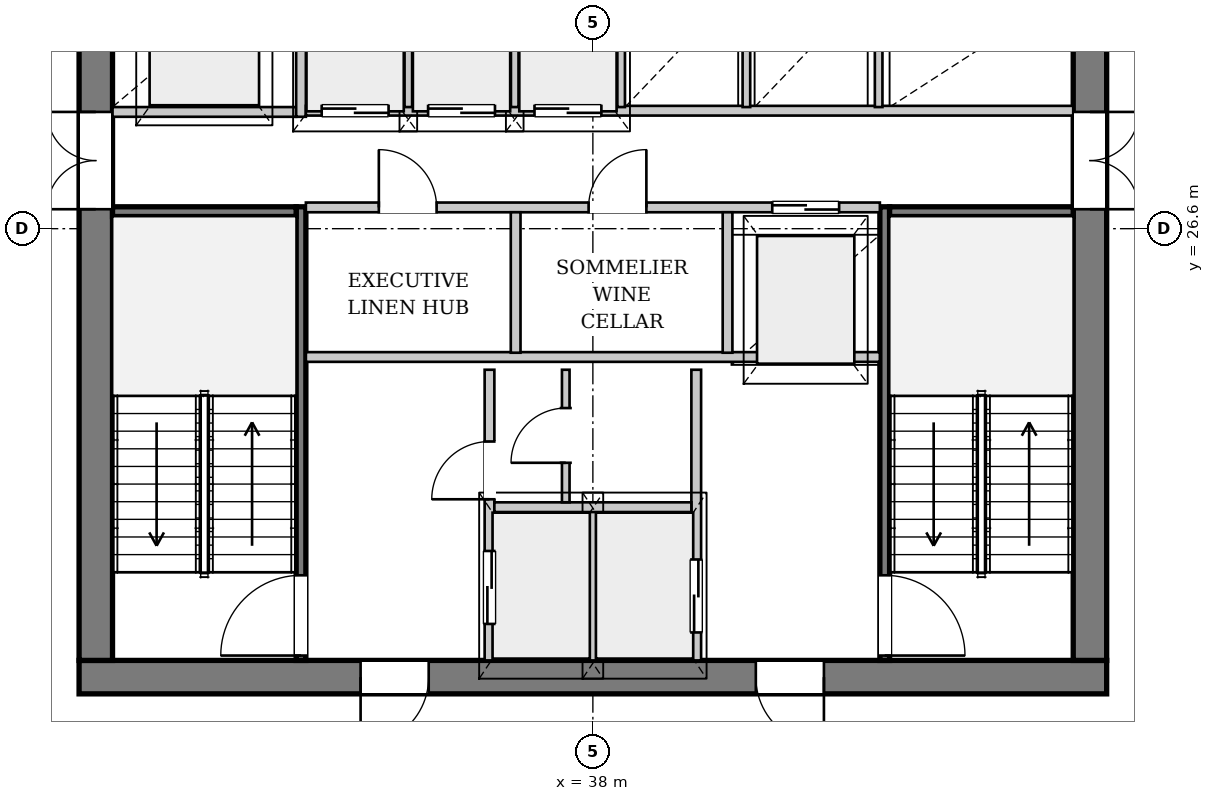
"""IFC4 building model, lengths in metres.
Left out: names, types, materials, properties, quantities, classifications, styles, units other than length and angle.
Written with IfcOpenShell. Run it as: python <this file> out.ifc"""

import sys

from ifc_helpers import new_model, si_unit, direction, frame, frame_2d, origin, place, context, subcontext, project, spatial, rectangle, extrude, source, transform, mapped, element, fill, save


model = new_model("IFC4")
c1 = context("Model", 3, precision=1e-05, world=origin(), true_north=direction((0.0, 1.0)))
c2 = subcontext(c1, "Body", "Model", "MODEL_VIEW")
j1 = project(units=[si_unit("LENGTHUNIT", "METRE"), si_unit("PLANEANGLEUNIT", "RADIAN")], contexts=[c1])
p1 = place(None, origin())
s1 = spatial("IfcSite", under=j1, at=p1, CompositionType="ELEMENT")
p2 = place(p1, origin())
s2 = spatial("IfcBuilding", under=s1, at=p2, CompositionType="ELEMENT")
p3 = place(p2, frame((0.0, 0.0, 153.7)))
s3 = spatial("IfcBuildingStorey", under=s2, at=p3, CompositionType="ELEMENT", Elevation=153.7)
p4 = place(p3, frame((52.816, 18.875, 0.0), z_axis=(0.0, 0.0, 1.0), x_axis=(-0.717927185301, -0.696118205914, 0.0)))
e1 = element("IfcWall", 1, at=p4, inside=s3, PredefinedType="SOLIDWALL", context=c2, shape_type="SweptSolid", body=[
    extrude(rectangle(XDim=23.598, YDim=0.32, at=frame_2d((11.799, 0.0))), origin(), (0.0, 0.0, 1.0), 2.692),
])
p5 = place(p4, frame((6.801, 0.0, 0.0)))
e2 = element("IfcOpeningElement", 2, at=p5, cuts=e1, PredefinedType="OPENING", context=c2, shape_type="SweptSolid", body=[
    extrude(rectangle(XDim=1.5, YDim=2.3, at=frame_2d((0.75, 1.15))), frame((0.0, 0.17, 0.0), z_axis=(0.0, -1.0, 0.0), x_axis=(1.0, 0.0, 0.0)), (0.0, 0.0, 1.0), 0.34),
])
p6 = place(p4, frame((16.163, 0.0, 0.25)))
e3 = element("IfcOpeningElement", 3, at=p6, cuts=e1, PredefinedType="OPENING", context=c2, shape_type="SweptSolid", body=[
    extrude(rectangle(XDim=2.6, YDim=2.35, at=frame_2d((1.3, 1.175))), frame((0.0, 0.17, 0.0), z_axis=(0.0, -1.0, 0.0), x_axis=(1.0, 0.0, 0.0)), (0.0, 0.0, 1.0), 0.34),
])
p7 = place(p3, frame((46.45, 19.225, 0.0), z_axis=(0.0, 0.0, 1.0), x_axis=(-1.0, 0.0, 0.0)))
e4 = element("IfcWall", 4, at=p7, inside=s3, PredefinedType="SHEAR", context=c2, shape_type="SweptSolid", body=[
    extrude(rectangle(XDim=16.9, YDim=0.55, at=frame_2d((8.45, 0.0))), origin(), (0.0, 0.0, 1.0), 3.3),
])
p8 = place(p7, frame((4.65, 0.0, 0.0)))
e5 = element("IfcOpeningElement", 5, at=p8, cuts=e4, PredefinedType="OPENING", context=c2, shape_type="SweptSolid", body=[
    extrude(rectangle(XDim=1.12, YDim=2.25, at=frame_2d((0.56, 1.125))), frame((0.0, 0.285, 0.0), z_axis=(0.0, -1.0, 0.0), x_axis=(1.0, 0.0, 0.0)), (0.0, 0.0, 1.0), 0.57),
])
p9 = place(p7, frame((11.15, 0.0, 0.0)))
e6 = element("IfcOpeningElement", 6, at=p9, cuts=e4, PredefinedType="OPENING", context=c2, shape_type="SweptSolid", body=[
    extrude(rectangle(XDim=1.12, YDim=2.25, at=frame_2d((0.56, 1.125))), frame((0.0, 0.285, 0.0), z_axis=(0.0, -1.0, 0.0), x_axis=(1.0, 0.0, 0.0)), (0.0, 0.0, 1.0), 0.57),
])
p10 = place(p3, frame((29.825, 19.5, 0.0), z_axis=(0.0, 0.0, 1.0), x_axis=(0.0, 1.0, 0.0)))
e7 = element("IfcWall", 7, at=p10, inside=s3, PredefinedType="SHEAR", context=c2, shape_type="SweptSolid", body=[
    extrude(rectangle(XDim=14.2, YDim=0.55, at=frame_2d((7.1, 0.0))), origin(), (0.0, 0.0, 1.0), 3.3),
])
p11 = place(p10, frame((7.42, 0.0, 0.0)))
e8 = element("IfcOpeningElement", 8, at=p11, cuts=e7, PredefinedType="OPENING", context=c2, shape_type="SweptSolid", body=[
    extrude(rectangle(XDim=1.6, YDim=2.2, at=frame_2d((0.8, 1.1))), frame((0.0, 0.285, 0.0), z_axis=(0.0, -1.0, 0.0), x_axis=(1.0, 0.0, 0.0)), (0.0, 0.0, 1.0), 0.57),
])
p12 = place(p3, frame((46.175, 33.7, 0.0), z_axis=(0.0, 0.0, 1.0), x_axis=(0.0, -1.0, 0.0)))
e9 = element("IfcWall", 9, at=p12, inside=s3, PredefinedType="SHEAR", context=c2, shape_type="SweptSolid", body=[
    extrude(rectangle(XDim=14.2, YDim=0.55, at=frame_2d((7.1, 0.0))), origin(), (0.0, 0.0, 1.0), 3.3),
])
p13 = place(p12, frame((5.18, 0.0, 0.0)))
e10 = element("IfcOpeningElement", 10, at=p13, cuts=e9, PredefinedType="OPENING", context=c2, shape_type="SweptSolid", body=[
    extrude(rectangle(XDim=1.6, YDim=2.2, at=frame_2d((0.8, 1.1))), frame((0.0, 0.285, 0.0), z_axis=(0.0, -1.0, 0.0), x_axis=(1.0, 0.0, 0.0)), (0.0, 0.0, 1.0), 0.57),
])
p14 = place(p12, frame((2.05, 0.0, 0.0)))
e11 = element("IfcOpeningElement", 11, at=p14, cuts=e9, PredefinedType="OPENING", context=c2, shape_type="SweptSolid", body=[
    extrude(rectangle(XDim=0.95, YDim=2.1, at=frame_2d((0.475, 1.05))), frame((0.0, 0.285, 0.0), z_axis=(0.0, -1.0, 0.0), x_axis=(1.0, 0.0, 0.0)), (0.0, 0.0, 1.0), 0.57),
])
p15 = place(p3, frame((33.2, 19.5, 0.0), z_axis=(0.0, 0.0, 1.0), x_axis=(0.0, 1.0, 0.0)))
e12 = element("IfcWall", 12, at=p15, inside=s3, PredefinedType="PARTITIONING", context=c2, shape_type="SweptSolid", body=[
    extrude(rectangle(XDim=7.46, YDim=0.16, at=frame_2d((3.73, 0.0))), origin(), (0.0, 0.0, 1.0), 3.3),
])
p16 = place(p15, frame((0.08, 0.0, 0.0)))
e13 = element("IfcOpeningElement", 13, at=p16, cuts=e12, PredefinedType="OPENING", context=c2, shape_type="SweptSolid", body=[
    extrude(rectangle(XDim=1.32, YDim=2.2, at=frame_2d((0.66, 1.1))), frame((0.0, 0.09, 0.0), z_axis=(0.0, -1.0, 0.0), x_axis=(1.0, 0.0, 0.0)), (0.0, 0.0, 1.0), 0.18),
])
p17 = place(p3, frame((30.1, 26.88, 0.0), z_axis=(0.0, 0.0, 1.0), x_axis=(1.0, 0.0, 0.0)))
e14 = element("IfcWall", 14, at=p17, inside=s3, PredefinedType="PARTITIONING", context=c2, shape_type="SweptSolid", body=[
    extrude(rectangle(XDim=3.02, YDim=0.16, at=frame_2d((1.51, 0.0))), origin(), (0.0, 0.0, 1.0), 3.3),
])
p18 = place(p3, frame((42.8, 26.96, 0.0), z_axis=(0.0, 0.0, 1.0), x_axis=(0.0, -1.0, 0.0)))
e15 = element("IfcWall", 15, at=p18, inside=s3, PredefinedType="PARTITIONING", context=c2, shape_type="SweptSolid", body=[
    extrude(rectangle(XDim=7.46, YDim=0.16, at=frame_2d((3.73, 0.0))), origin(), (0.0, 0.0, 1.0), 3.3),
])
p19 = place(p18, frame((6.06, 0.0, 0.0)))
e16 = element("IfcOpeningElement", 16, at=p19, cuts=e15, PredefinedType="OPENING", context=c2, shape_type="SweptSolid", body=[
    extrude(rectangle(XDim=1.32, YDim=2.2, at=frame_2d((0.66, 1.1))), frame((0.0, 0.09, 0.0), z_axis=(0.0, -1.0, 0.0), x_axis=(1.0, 0.0, 0.0)), (0.0, 0.0, 1.0), 0.18),
])
p20 = place(p3, frame((42.88, 26.88, 0.0), z_axis=(0.0, 0.0, 1.0), x_axis=(1.0, 0.0, 0.0)))
e17 = element("IfcWall", 17, at=p20, inside=s3, PredefinedType="PARTITIONING", context=c2, shape_type="SweptSolid", body=[
    extrude(rectangle(XDim=3.02, YDim=0.16, at=frame_2d((1.51, 0.0))), origin(), (0.0, 0.0, 1.0), 3.3),
])
p21 = place(p3, frame((36.3, 19.5, 0.0), z_axis=(0.0, 0.0, 1.0), x_axis=(0.0, 1.0, 0.0)))
e18 = element("IfcWall", 18, at=p21, inside=s3, PredefinedType="PARTITIONING", context=c2, shape_type="SweptSolid", body=[
    extrude(rectangle(XDim=4.78, YDim=0.16, at=frame_2d((2.39, 0.0))), origin(), (0.0, 0.0, 1.0), 3.3),
])
p22 = place(p21, frame((0.6, 0.0, 0.0)))
e19 = element("IfcOpeningElement", 19, at=p22, cuts=e18, PredefinedType="OPENING", context=c2, shape_type="SweptSolid", body=[
    extrude(rectangle(XDim=1.2, YDim=2.2, at=frame_2d((0.6, 1.1))), frame((0.0, 0.09, 0.0), z_axis=(0.0, -1.0, 0.0), x_axis=(1.0, 0.0, 0.0)), (0.0, 0.0, 1.0), 0.18),
])
p23 = place(p21, frame((2.65, 0.0, 0.0)))
e20 = element("IfcOpeningElement", 20, at=p23, cuts=e18, PredefinedType="OPENING", context=c2, shape_type="SweptSolid", body=[
    extrude(rectangle(XDim=0.95, YDim=2.1, at=frame_2d((0.475, 1.05))), frame((0.0, 0.09, 0.0), z_axis=(0.0, -1.0, 0.0), x_axis=(1.0, 0.0, 0.0)), (0.0, 0.0, 1.0), 0.18),
])
p24 = place(p3, frame((39.7, 24.28, 0.0), z_axis=(0.0, 0.0, 1.0), x_axis=(0.0, -1.0, 0.0)))
e21 = element("IfcWall", 21, at=p24, inside=s3, PredefinedType="PARTITIONING", context=c2, shape_type="SweptSolid", body=[
    extrude(rectangle(XDim=4.78, YDim=0.16, at=frame_2d((2.39, 0.0))), origin(), (0.0, 0.0, 1.0), 3.3),
])
p25 = place(p24, frame((3.12, 0.0, 0.0)))
e22 = element("IfcOpeningElement", 22, at=p25, cuts=e21, PredefinedType="OPENING", context=c2, shape_type="SweptSolid", body=[
    extrude(rectangle(XDim=1.2, YDim=2.2, at=frame_2d((0.6, 1.1))), frame((0.0, 0.09, 0.0), z_axis=(0.0, -1.0, 0.0), x_axis=(1.0, 0.0, 0.0)), (0.0, 0.0, 1.0), 0.18),
])
p26 = place(p3, frame((38.0, 19.5, 0.0), z_axis=(0.0, 0.0, 1.0), x_axis=(0.0, 1.0, 0.0)))
e23 = element("IfcWall", 23, at=p26, inside=s3, PredefinedType="PARTITIONING", context=c2, shape_type="SweptSolid", body=[
    extrude(rectangle(XDim=2.46, YDim=0.125, at=frame_2d((1.23, 0.0))), origin(), (0.0, 0.0, 1.0), 3.3),
])
p27 = place(p3, frame((36.38, 22.02, 0.0), z_axis=(0.0, 0.0, 1.0), x_axis=(1.0, 0.0, 0.0)))
e24 = element("IfcWall", 24, at=p27, inside=s3, PredefinedType="PARTITIONING", context=c2, shape_type="SweptSolid", body=[
    extrude(rectangle(XDim=3.24, YDim=0.16, at=frame_2d((1.62, 0.0))), origin(), (0.0, 0.0, 1.0), 3.3),
])
p28 = place(p3, frame((33.28, 24.49, 0.0), z_axis=(0.0, 0.0, 1.0), x_axis=(1.0, 0.0, 0.0)))
e25 = element("IfcWall", 25, at=p28, inside=s3, PredefinedType="PARTITIONING", context=c2, shape_type="SweptSolid", body=[
    extrude(rectangle(XDim=9.44, YDim=0.16, at=frame_2d((4.72, 0.0))), origin(), (0.0, 0.0, 1.0), 3.3),
])
p29 = place(p3, frame((37.554, 22.1, 0.0), z_axis=(0.0, 0.0, 1.0), x_axis=(0.0, 1.0, 0.0)))
e26 = element("IfcWall", 26, at=p29, inside=s3, PredefinedType="PARTITIONING", context=c2, shape_type="SweptSolid", body=[
    extrude(rectangle(XDim=2.18, YDim=0.125, at=frame_2d((1.09, 0.0))), origin(), (0.0, 0.0, 1.0), 3.3),
])
p30 = place(p29, frame((0.65, 0.0, 0.0)))
e27 = element("IfcOpeningElement", 27, at=p30, cuts=e26, PredefinedType="OPENING", context=c2, shape_type="SweptSolid", body=[
    extrude(rectangle(XDim=0.9, YDim=2.1, at=frame_2d((0.45, 1.05))), frame((0.0, 0.073, 0.0), z_axis=(0.0, -1.0, 0.0), x_axis=(1.0, 0.0, 0.0)), (0.0, 0.0, 1.0), 0.145),
])
p31 = place(p3, frame((30.1, 28.52, 0.0), z_axis=(0.0, 0.0, 1.0), x_axis=(1.0, 0.0, 0.0)))
e28 = element("IfcWall", 28, at=p31, inside=s3, PredefinedType="PARTITIONING", context=c2, shape_type="SweptSolid", body=[
    extrude(rectangle(XDim=3.02, YDim=0.16, at=frame_2d((1.51, 0.0))), origin(), (0.0, 0.0, 1.0), 3.3),
])
p32 = place(p3, frame((33.2, 28.44, 0.0), z_axis=(0.0, 0.0, 1.0), x_axis=(0.0, 1.0, 0.0)))
e29 = element("IfcWall", 29, at=p32, inside=s3, PredefinedType="PARTITIONING", context=c2, shape_type="SweptSolid", body=[
    extrude(rectangle(XDim=5.26, YDim=0.16, at=frame_2d((2.63, 0.0))), origin(), (0.0, 0.0, 1.0), 3.3),
])
p33 = place(p3, frame((33.28, 26.95, 0.0), z_axis=(0.0, 0.0, 1.0), x_axis=(1.0, 0.0, 0.0)))
e30 = element("IfcWall", 30, at=p33, inside=s3, PredefinedType="PARTITIONING", context=c2, shape_type="SweptSolid", body=[
    extrude(rectangle(XDim=9.44, YDim=0.16, at=frame_2d((4.72, 0.0))), origin(), (0.0, 0.0, 1.0), 3.3),
])
p34 = place(p33, frame((1.2, 0.0, 0.0)))
e31 = element("IfcOpeningElement", 31, at=p34, cuts=e30, PredefinedType="OPENING", context=c2, shape_type="SweptSolid", body=[
    extrude(rectangle(XDim=0.95, YDim=2.1, at=frame_2d((0.475, 1.05))), frame((0.0, 0.09, 0.0), z_axis=(0.0, -1.0, 0.0), x_axis=(1.0, 0.0, 0.0)), (0.0, 0.0, 1.0), 0.18),
])
p35 = place(p33, frame((4.65, 0.0, 0.0)))
e32 = element("IfcOpeningElement", 32, at=p35, cuts=e30, PredefinedType="OPENING", context=c2, shape_type="SweptSolid", body=[
    extrude(rectangle(XDim=0.95, YDim=2.1, at=frame_2d((0.475, 1.05))), frame((0.0, 0.09, 0.0), z_axis=(0.0, -1.0, 0.0), x_axis=(1.0, 0.0, 0.0)), (0.0, 0.0, 1.0), 0.18),
])
p36 = place(p33, frame((7.67, 0.0, 0.0)))
e33 = element("IfcOpeningElement", 33, at=p36, cuts=e30, PredefinedType="OPENING", context=c2, shape_type="SweptSolid", body=[
    extrude(rectangle(XDim=1.1, YDim=2.2, at=frame_2d((0.55, 1.1))), frame((0.0, 0.09, 0.0), z_axis=(0.0, -1.0, 0.0), x_axis=(1.0, 0.0, 0.0)), (0.0, 0.0, 1.0), 0.18),
])
for number, where, z_axis, x_axis in (
    (34, (36.73, 24.56, 0.0), (0.0, 0.0, 1.0), (0.0, 1.0, 0.0)),
    (35, (40.215, 24.56, 0.0), (0.0, 0.0, 1.0), (0.0, 1.0, 0.0)),
):
    element("IfcWall", number, at=place(p3, frame(where, z_axis=z_axis, x_axis=x_axis)), inside=s3, PredefinedType="PARTITIONING", context=c2, shape_type="SweptSolid", body=[
        extrude(rectangle(XDim=2.31, YDim=0.16, at=frame_2d((1.155, 0.0))), origin(), (0.0, 0.0, 1.0), 3.3),
    ])
p37 = place(p3, frame((33.28, 28.54, 0.0), z_axis=(0.0, 0.0, 1.0), x_axis=(1.0, 0.0, 0.0)))
e36 = element("IfcWall", 36, at=p37, inside=s3, PredefinedType="PARTITIONING", context=c2, shape_type="SweptSolid", body=[
    extrude(rectangle(XDim=12.62, YDim=0.16, at=frame_2d((6.31, 0.0))), origin(), (0.0, 0.0, 1.0), 3.3),
])
p38 = place(p37, frame((0.26, 0.0, 0.0)))
e37 = element("IfcOpeningElement", 37, at=p38, cuts=e36, PredefinedType="OPENING", context=c2, shape_type="SweptSolid", body=[
    extrude(rectangle(XDim=1.1, YDim=2.2, at=frame_2d((0.55, 1.1))), frame((0.0, 0.09, 0.0), z_axis=(0.0, -1.0, 0.0), x_axis=(1.0, 0.0, 0.0)), (0.0, 0.0, 1.0), 0.18),
])
p39 = place(p37, frame((2.01, 0.0, 0.0)))
e38 = element("IfcOpeningElement", 38, at=p39, cuts=e36, PredefinedType="OPENING", context=c2, shape_type="SweptSolid", body=[
    extrude(rectangle(XDim=1.1, YDim=2.2, at=frame_2d((0.55, 1.1))), frame((0.0, 0.09, 0.0), z_axis=(0.0, -1.0, 0.0), x_axis=(1.0, 0.0, 0.0)), (0.0, 0.0, 1.0), 0.18),
])
p40 = place(p37, frame((3.76, 0.0, 0.0)))
e39 = element("IfcOpeningElement", 39, at=p40, cuts=e36, PredefinedType="OPENING", context=c2, shape_type="SweptSolid", body=[
    extrude(rectangle(XDim=1.1, YDim=2.2, at=frame_2d((0.55, 1.1))), frame((0.0, 0.09, 0.0), z_axis=(0.0, -1.0, 0.0), x_axis=(1.0, 0.0, 0.0)), (0.0, 0.0, 1.0), 0.18),
])
for number, where, z_axis, x_axis in (
    (40, (34.965, 28.6, 0.0), (0.0, 0.0, 1.0), (0.0, 1.0, 0.0)),
    (41, (36.715, 28.6, 0.0), (0.0, 0.0, 1.0), (0.0, 1.0, 0.0)),
    (42, (38.465, 28.6, 0.0), (0.0, 0.0, 1.0), (0.0, 1.0, 0.0)),
    (43, (40.525, 28.6, 0.0), (0.0, 0.0, 1.0), (0.0, 1.0, 0.0)),
    (44, (42.7, 28.6, 0.0), (0.0, 0.0, 1.0), (0.0, 1.0, 0.0)),
):
    element("IfcWall", number, at=place(p3, frame(where, z_axis=z_axis, x_axis=x_axis)), inside=s3, PredefinedType="PARTITIONING", context=c2, shape_type="SweptSolid", body=[
        extrude(rectangle(XDim=1.92, YDim=0.125, at=frame_2d((0.96, 0.0))), origin(), (0.0, 0.0, 1.0), 3.3),
    ])
m1 = source(origin(), c2, "Body", "SweptSolid", [
    extrude(rectangle(XDim=1.12, YDim=2.25, at=frame_2d((0.56, 1.125))), frame((0.0, 0.025, 0.0), z_axis=(0.0, -1.0, 0.0), x_axis=(1.0, 0.0, 0.0)), (0.0, 0.0, 1.0), 0.05),
])
p41 = place(p8, origin())
e45 = element("IfcDoor", 45, at=p41, inside=s3, OperationType="SINGLE_SWING_LEFT", PredefinedType="DOOR", context=c2, shape_type="MappedRepresentation", body=[
    mapped(m1, transform((0.0, 0.0, 0.0), x_axis=(1.0, 0.0, 0.0), y_axis=(0.0, 1.0, 0.0), z_axis=(0.0, 0.0, 1.0), scale=1.0)),
])
fill(e5, e45)
p42 = place(p9, origin())
e46 = element("IfcDoor", 46, at=p42, inside=s3, OperationType="SINGLE_SWING_RIGHT", PredefinedType="DOOR", context=c2, shape_type="MappedRepresentation", body=[
    mapped(m1, transform((0.0, 0.0, 0.0), x_axis=(1.0, 0.0, 0.0), y_axis=(0.0, 1.0, 0.0), z_axis=(0.0, 0.0, 1.0), scale=1.0)),
])
fill(e6, e46)
m2 = source(origin(), c2, "Body", "SweptSolid", [
    extrude(rectangle(XDim=1.6, YDim=2.2, at=frame_2d((0.8, 1.1))), frame((0.0, 0.025, 0.0), z_axis=(0.0, -1.0, 0.0), x_axis=(1.0, 0.0, 0.0)), (0.0, 0.0, 1.0), 0.05),
])
p43 = place(p11, origin())
e47 = element("IfcDoor", 47, at=p43, inside=s3, OperationType="DOUBLE_DOOR_SINGLE_SWING", PredefinedType="DOOR", context=c2, shape_type="MappedRepresentation", body=[
    mapped(m2, transform((0.0, 0.0, 0.0), x_axis=(1.0, 0.0, 0.0), y_axis=(0.0, 1.0, 0.0), z_axis=(0.0, 0.0, 1.0), scale=1.0)),
])
fill(e8, e47)
p44 = place(p13, origin())
e48 = element("IfcDoor", 48, at=p44, inside=s3, OperationType="DOUBLE_DOOR_SINGLE_SWING", PredefinedType="DOOR", context=c2, shape_type="MappedRepresentation", body=[
    mapped(m2, transform((0.0, 0.0, 0.0), x_axis=(1.0, 0.0, 0.0), y_axis=(0.0, 1.0, 0.0), z_axis=(0.0, 0.0, 1.0), scale=1.0)),
])
fill(e10, e48)
m3 = source(origin(), c2, "Body", "SweptSolid", [
    extrude(rectangle(XDim=1.32, YDim=2.2, at=frame_2d((0.66, 1.1))), frame((0.0, 0.025, 0.0), z_axis=(0.0, -1.0, 0.0), x_axis=(1.0, 0.0, 0.0)), (0.0, 0.0, 1.0), 0.05),
])
p45 = place(p16, origin())
e49 = element("IfcDoor", 49, at=p45, inside=s3, OperationType="SINGLE_SWING_LEFT", PredefinedType="DOOR", context=c2, shape_type="MappedRepresentation", body=[
    mapped(m3, transform((0.0, 0.0, 0.0), x_axis=(1.0, 0.0, 0.0), y_axis=(0.0, 1.0, 0.0), z_axis=(0.0, 0.0, 1.0), scale=1.0)),
])
fill(e13, e49)
p46 = place(p19, origin())
e50 = element("IfcDoor", 50, at=p46, inside=s3, OperationType="SINGLE_SWING_RIGHT", PredefinedType="DOOR", context=c2, shape_type="MappedRepresentation", body=[
    mapped(m3, transform((0.0, 0.0, 0.0), x_axis=(1.0, 0.0, 0.0), y_axis=(0.0, 1.0, 0.0), z_axis=(0.0, 0.0, 1.0), scale=1.0)),
])
fill(e16, e50)
m4 = source(origin(), c2, "Body", "SweptSolid", [
    extrude(rectangle(XDim=1.2, YDim=2.2, at=frame_2d((0.6, 1.1))), frame((0.0, 0.025, 0.0), z_axis=(0.0, -1.0, 0.0), x_axis=(1.0, 0.0, 0.0)), (0.0, 0.0, 1.0), 0.05),
])
p47 = place(p22, origin())
e51 = element("IfcDoor", 51, at=p47, inside=s3, OperationType="DOUBLE_DOOR_SLIDING", PredefinedType="DOOR", context=c2, shape_type="MappedRepresentation", body=[
    mapped(m4, transform((0.0, 0.0, 0.0), x_axis=(1.0, 0.0, 0.0), y_axis=(0.0, 1.0, 0.0), z_axis=(0.0, 0.0, 1.0), scale=1.0)),
])
fill(e19, e51)
m5 = source(origin(), c2, "Body", "SweptSolid", [
    extrude(rectangle(XDim=0.95, YDim=2.1, at=frame_2d((0.475, 1.05))), frame((0.0, 0.025, 0.0), z_axis=(0.0, -1.0, 0.0), x_axis=(1.0, 0.0, 0.0)), (0.0, 0.0, 1.0), 0.05),
])
p48 = place(p23, origin())
e52 = element("IfcDoor", 52, at=p48, inside=s3, OperationType="SINGLE_SWING_LEFT", PredefinedType="DOOR", context=c2, shape_type="MappedRepresentation", body=[
    mapped(m5, transform((0.0, 0.0, 0.0), x_axis=(1.0, 0.0, 0.0), y_axis=(0.0, 1.0, 0.0), z_axis=(0.0, 0.0, 1.0), scale=1.0)),
])
fill(e20, e52)
m6 = source(origin(), c2, "Body", "SweptSolid", [
    extrude(rectangle(XDim=0.9, YDim=2.1, at=frame_2d((0.45, 1.05))), frame((0.0, 0.025, 0.0), z_axis=(0.0, -1.0, 0.0), x_axis=(1.0, 0.0, 0.0)), (0.0, 0.0, 1.0), 0.05),
])
p49 = place(p30, origin())
e53 = element("IfcDoor", 53, at=p49, inside=s3, OperationType="SINGLE_SWING_LEFT", PredefinedType="DOOR", context=c2, shape_type="MappedRepresentation", body=[
    mapped(m6, transform((0.0, 0.0, 0.0), x_axis=(1.0, 0.0, 0.0), y_axis=(0.0, 1.0, 0.0), z_axis=(0.0, 0.0, 1.0), scale=1.0)),
])
fill(e27, e53)
p50 = place(p25, origin())
e54 = element("IfcDoor", 54, at=p50, inside=s3, OperationType="DOUBLE_DOOR_SLIDING", PredefinedType="DOOR", context=c2, shape_type="MappedRepresentation", body=[
    mapped(m4, transform((0.0, 0.0, 0.0), x_axis=(1.0, 0.0, 0.0), y_axis=(0.0, 1.0, 0.0), z_axis=(0.0, 0.0, 1.0), scale=1.0)),
])
fill(e22, e54)
p51 = place(p34, origin())
e55 = element("IfcDoor", 55, at=p51, inside=s3, OperationType="SINGLE_SWING_LEFT", PredefinedType="DOOR", context=c2, shape_type="MappedRepresentation", body=[
    mapped(m5, transform((0.0, 0.0, 0.0), x_axis=(1.0, 0.0, 0.0), y_axis=(0.0, 1.0, 0.0), z_axis=(0.0, 0.0, 1.0), scale=1.0)),
])
fill(e31, e55)
p52 = place(p35, origin())
e56 = element("IfcDoor", 56, at=p52, inside=s3, OperationType="SINGLE_SWING_RIGHT", PredefinedType="DOOR", context=c2, shape_type="MappedRepresentation", body=[
    mapped(m5, transform((0.0, 0.0, 0.0), x_axis=(1.0, 0.0, 0.0), y_axis=(0.0, 1.0, 0.0), z_axis=(0.0, 0.0, 1.0), scale=1.0)),
])
fill(e32, e56)
m7 = source(origin(), c2, "Body", "SweptSolid", [
    extrude(rectangle(XDim=1.1, YDim=2.2, at=frame_2d((0.55, 1.1))), frame((0.0, 0.025, 0.0), z_axis=(0.0, -1.0, 0.0), x_axis=(1.0, 0.0, 0.0)), (0.0, 0.0, 1.0), 0.05),
])
p53 = place(p36, origin())
e57 = element("IfcDoor", 57, at=p53, inside=s3, OperationType="DOUBLE_DOOR_SLIDING", PredefinedType="DOOR", context=c2, shape_type="MappedRepresentation", body=[
    mapped(m7, transform((0.0, 0.0, 0.0), x_axis=(1.0, 0.0, 0.0), y_axis=(0.0, 1.0, 0.0), z_axis=(0.0, 0.0, 1.0), scale=1.0)),
])
fill(e33, e57)
p54 = place(p38, origin())
e58 = element("IfcDoor", 58, at=p54, inside=s3, OperationType="DOUBLE_DOOR_SLIDING", PredefinedType="DOOR", context=c2, shape_type="MappedRepresentation", body=[
    mapped(m7, transform((0.0, 0.0, 0.0), x_axis=(1.0, 0.0, 0.0), y_axis=(0.0, 1.0, 0.0), z_axis=(0.0, 0.0, 1.0), scale=1.0)),
])
fill(e37, e58)
p55 = place(p39, origin())
e59 = element("IfcDoor", 59, at=p55, inside=s3, OperationType="DOUBLE_DOOR_SLIDING", PredefinedType="DOOR", context=c2, shape_type="MappedRepresentation", body=[
    mapped(m7, transform((0.0, 0.0, 0.0), x_axis=(1.0, 0.0, 0.0), y_axis=(0.0, 1.0, 0.0), z_axis=(0.0, 0.0, 1.0), scale=1.0)),
])
fill(e38, e59)
p56 = place(p40, origin())
e60 = element("IfcDoor", 60, at=p56, inside=s3, OperationType="DOUBLE_DOOR_SLIDING", PredefinedType="DOOR", context=c2, shape_type="MappedRepresentation", body=[
    mapped(m7, transform((0.0, 0.0, 0.0), x_axis=(1.0, 0.0, 0.0), y_axis=(0.0, 1.0, 0.0), z_axis=(0.0, 0.0, 1.0), scale=1.0)),
])
fill(e39, e60)
save(model, sys.argv[1])
